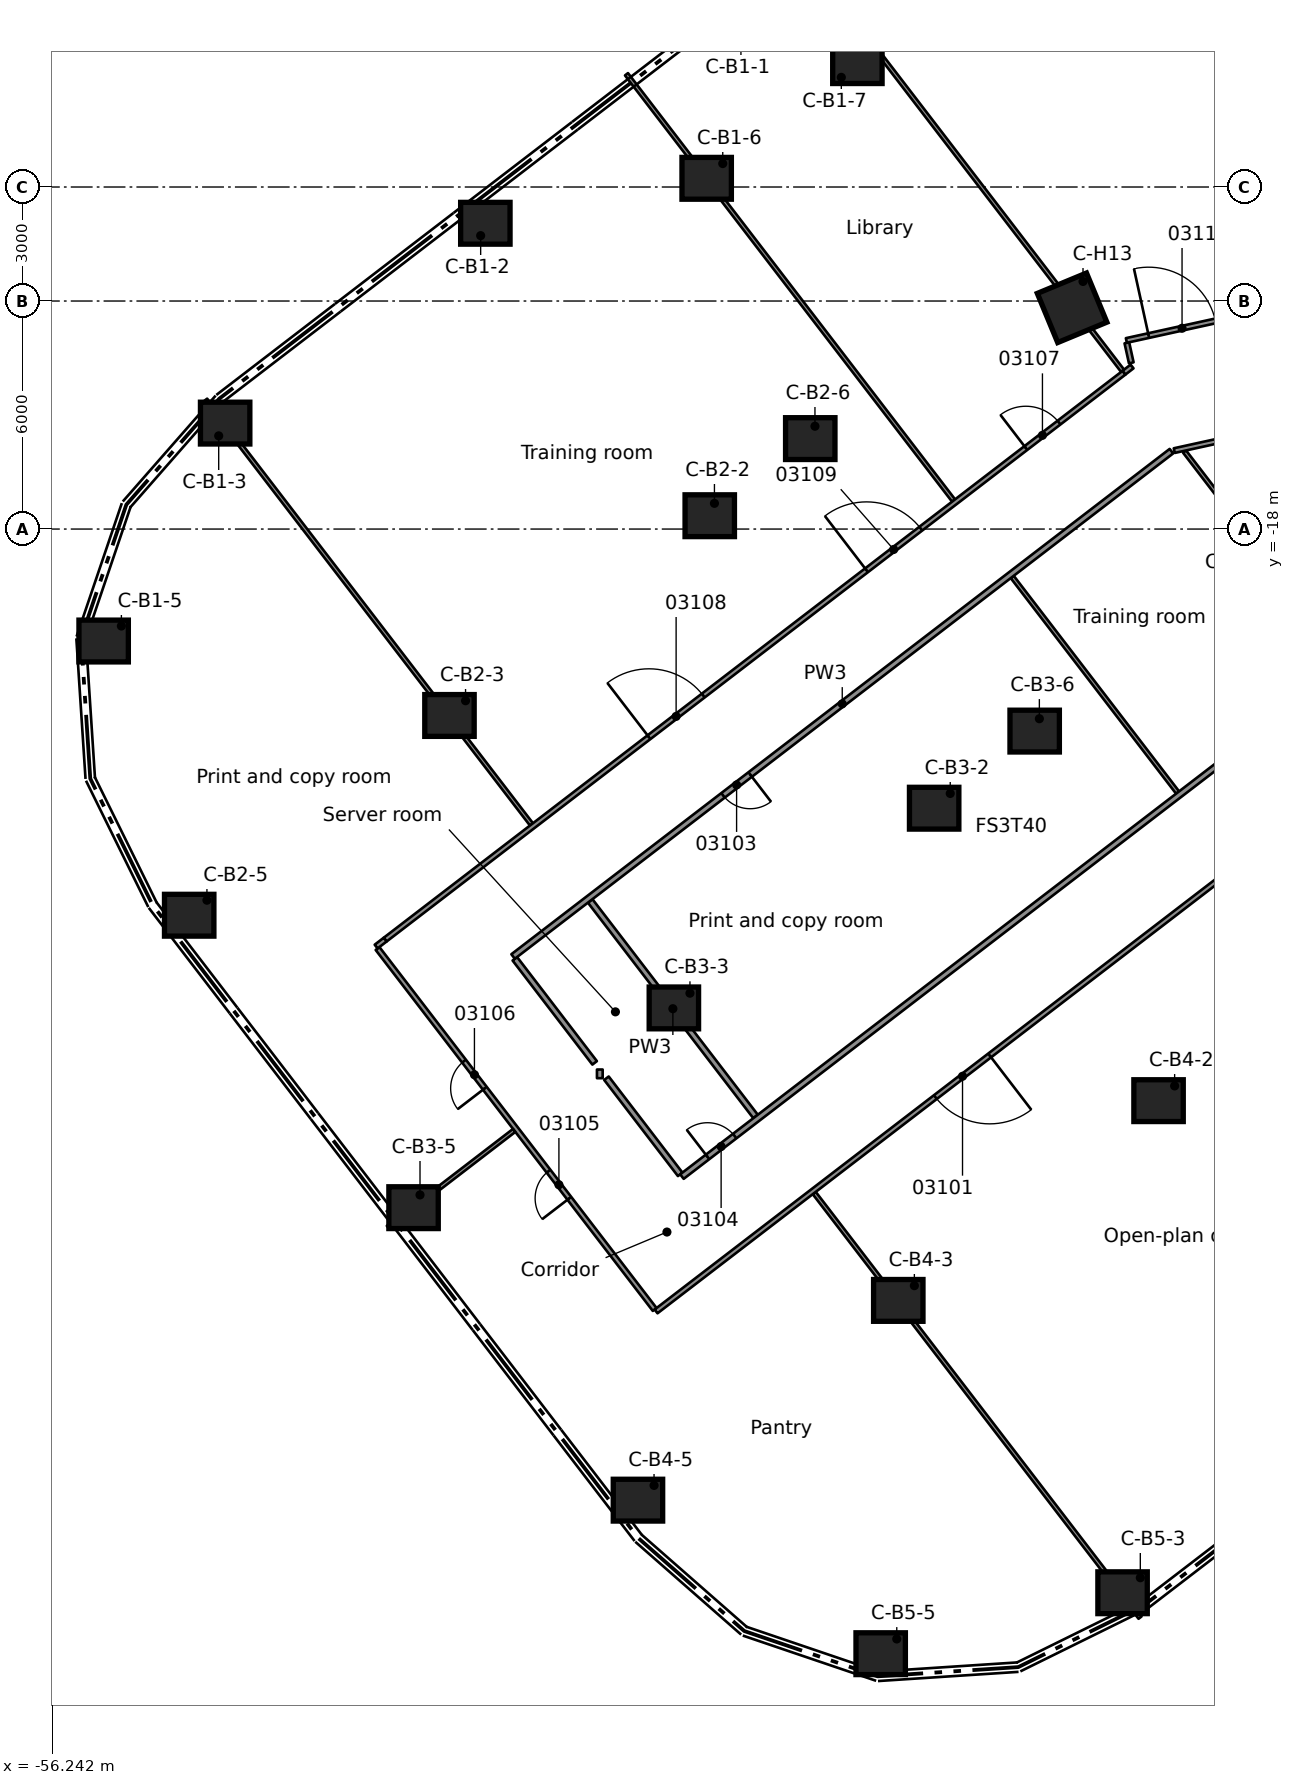
"""IFC4 building model, lengths in metres.
Left out: names, types, materials, properties, quantities, classifications, styles, units other than length and angle.
Written with IfcOpenShell. Run it as: python <this file> out.ifc"""

import sys

from ifc_helpers import new_model, si_unit, direction, frame, frame_2d, origin, origin_2d, place, context, subcontext, project, spatial, rectangle, extrude, element, fill, save


model = new_model("IFC4")
c1 = context("Model", 3, precision=1e-05, world=origin(), true_north=direction((0.0, 1.0)))
c2 = subcontext(c1, "Body", "Model", "MODEL_VIEW")
j1 = project(units=[si_unit("LENGTHUNIT", "METRE"), si_unit("PLANEANGLEUNIT", "RADIAN")], contexts=[c1])
p1 = place(None, origin())
s1 = spatial("IfcSite", under=j1, at=p1, CompositionType="ELEMENT")
p2 = place(p1, origin())
s2 = spatial("IfcBuilding", under=s1, at=p2, CompositionType="ELEMENT")
p3 = place(p2, frame((0.0, 0.0, 15.5)))
s3 = spatial("IfcBuildingStorey", under=s2, at=p3, CompositionType="ELEMENT", Elevation=15.5)
for number, where, z_axis, x_axis in (
    (1, (-44.84, -9.954, 0.0), (0.0, 0.0, 1.0), (1.0, 0.0, 0.0)),
    (2, (-51.687, -15.212, 0.0), (0.0, 0.0, 1.0), (1.0, 0.0, 0.0)),
    (3, (-54.884, -20.946, 0.0), (0.0, 0.0, 1.0), (1.0, 0.0, 0.0)),
    (4, (-39.016, -8.771, 0.0), (0.0, 0.0, 1.0), (1.0, 0.0, 0.0)),
    (5, (-35.05, -5.727, 0.0), (0.0, 0.0, 1.0), (1.0, 0.0, 0.0)),
    (6, (-38.935, -17.649, 0.0), (0.0, 0.0, 1.0), (1.0, 0.0, 0.0)),
    (7, (-45.784, -22.905, 0.0), (0.0, 0.0, 1.0), (1.0, 0.0, 0.0)),
    (8, (-52.633, -28.161, 0.0), (0.0, 0.0, 1.0), (1.0, 0.0, 0.0)),
    (9, (-36.29, -15.62, 0.0), (0.0, 0.0, 1.0), (1.0, 0.0, 0.0)),
    (10, (-33.03, -25.345, 0.0), (0.0, 0.0, 1.0), (1.0, 0.0, 0.0)),
    (11, (-39.879, -30.6, 0.0), (0.0, 0.0, 1.0), (1.0, 0.0, 0.0)),
    (12, (-46.729, -35.856, 0.0), (0.0, 0.0, 1.0), (1.0, 0.0, 0.0)),
    (13, (-30.385, -23.316, 0.0), (0.0, 0.0, 1.0), (1.0, 0.0, 0.0)),
    (14, (-27.125, -33.04, 0.0), (0.0, 0.0, 1.0), (1.0, 0.0, 0.0)),
    (15, (-33.974, -38.296, 0.0), (0.0, 0.0, 1.0), (1.0, 0.0, 0.0)),
    (16, (-40.824, -43.552, 0.0), (0.0, 0.0, 1.0), (1.0, 0.0, 0.0)),
    (17, (-28.072, -45.988, 0.0), (0.0, 0.0, 1.0), (1.0, 0.0, 0.0)),
    (18, (-34.437, -47.592, 0.0), (0.0, 0.0, 1.0), (1.0, 0.0, 0.0)),
):
    element("IfcColumn", number, at=place(p3, frame(where, z_axis=z_axis, x_axis=x_axis)), inside=s3, PredefinedType="COLUMN", context=c2, shape_type="SweptSolid", body=[
        extrude(rectangle(XDim=1.3, YDim=1.1, at=origin_2d()), origin(), (0.0, 0.0, 1.0), 5.0),
    ])
p4 = place(p3, frame((-29.4, -12.178, 0.0), z_axis=(0.0, 0.0, 1.0), x_axis=(-0.923879532511, -0.382683432365, 0.0)))
e19 = element("IfcColumn", 19, at=p4, inside=s3, PredefinedType="COLUMN", context=c2, shape_type="SweptSolid", body=[
    extrude(rectangle(XDim=1.4, YDim=1.4, at=origin_2d()), origin(), (0.0, 0.0, 1.0), 5.0),
])
p5 = place(p3, frame((-27.959, -13.1, 0.0), z_axis=(0.0, 0.0, 1.0), x_axis=(0.215346078447, -0.976537795734, 0.0)))
e20 = element("IfcWall", 20, at=p5, inside=s3, PredefinedType="PARTITIONING", context=c2, shape_type="SweptSolid", body=[
    extrude(rectangle(XDim=0.539, YDim=0.125, at=frame_2d((0.269, 0.0))), origin(), (0.0, 0.0, 1.0), 4.58),
])
p6 = place(p3, frame((-40.384, -38.535, 0.0), z_axis=(0.0, 0.0, 1.0), x_axis=(-0.609026744184, 0.793149686294, 0.0)))
e21 = element("IfcWall", 21, at=p6, inside=s3, PredefinedType="PARTITIONING", context=c2, shape_type="SweptSolid", body=[
    extrude(rectangle(XDim=11.975, YDim=0.125, at=frame_2d((5.987, 0.0))), origin(), (0.0, 0.0, 1.0), 4.58),
])
p7 = place(p6, frame((3.688, 0.0, 0.0)))
e22 = element("IfcOpeningElement", 22, at=p7, cuts=e21, PredefinedType="OPENING", context=c2, shape_type="SweptSolid", body=[
    extrude(rectangle(XDim=0.9, YDim=2.1, at=frame_2d((0.45, 1.05))), frame((0.0, 0.073, 0.0), z_axis=(0.0, -1.0, 0.0), x_axis=(1.0, 0.0, 0.0)), (0.0, 0.0, 1.0), 0.145),
])
p8 = place(p6, frame((7.338, 0.0, 0.0)))
e23 = element("IfcOpeningElement", 23, at=p8, cuts=e21, PredefinedType="OPENING", context=c2, shape_type="SweptSolid", body=[
    extrude(rectangle(XDim=0.9, YDim=2.1, at=frame_2d((0.45, 1.05))), frame((0.0, 0.073, 0.0), z_axis=(0.0, -1.0, 0.0), x_axis=(1.0, 0.0, 0.0)), (0.0, 0.0, 1.0), 0.145),
])
p9 = place(p3, frame((-44.064, -29.307, 0.0), z_axis=(0.0, 0.0, 1.0), x_axis=(0.608421148176, -0.793614331053, 0.0)))
e24 = element("IfcWall", 24, at=p9, inside=s3, PredefinedType="PARTITIONING", context=c2, shape_type="SweptSolid", body=[
    extrude(rectangle(XDim=3.451, YDim=0.15, at=frame_2d((1.726, 0.0))), origin(), (0.0, 0.0, 1.0), 4.58),
])
p10 = place(p3, frame((-41.653, -32.45, 0.0), z_axis=(0.0, 0.0, 1.0), x_axis=(0.60867753108, -0.793417710389, 0.0)))
e25 = element("IfcWall", 25, at=p10, inside=s3, PredefinedType="PARTITIONING", context=c2, shape_type="SweptSolid", body=[
    extrude(rectangle(XDim=3.188, YDim=0.15, at=frame_2d((1.594, 0.0))), origin(), (0.0, 0.0, 1.0), 4.58),
])
p11 = place(p3, frame((-52.2, -14.599, 0.0), z_axis=(0.0, 0.0, 1.0), x_axis=(0.608818023879, -0.793309910312, 0.0)))
e26 = element("IfcWall", 26, at=p11, inside=s3, PredefinedType="PARTITIONING", context=c2, shape_type="SweptSolid", body=[
    extrude(rectangle(XDim=14.081, YDim=0.1, at=frame_2d((7.041, 0.0))), origin(), (0.0, 0.0, 1.0), 4.58),
])
p12 = place(p3, frame((-42.081, -27.785, 0.0), z_axis=(0.0, 0.0, 1.0), x_axis=(0.608713303315, -0.793390266116, 0.0)))
e27 = element("IfcWall", 27, at=p12, inside=s3, PredefinedType="PARTITIONING", context=c2, shape_type="SweptSolid", body=[
    extrude(rectangle(XDim=7.148, YDim=0.15, at=frame_2d((3.574, 0.0))), origin(), (0.0, 0.0, 1.0), 4.58),
])
p13 = place(p3, frame((-36.185, -35.471, 0.0), z_axis=(0.0, 0.0, 1.0), x_axis=(0.608776156658, -0.793342039152, 0.0)))
e28 = element("IfcWall", 28, at=p13, inside=s3, PredefinedType="PARTITIONING", context=c2, shape_type="SweptSolid", body=[
    extrude(rectangle(XDim=14.082, YDim=0.1, at=frame_2d((7.041, 0.0))), origin(), (0.0, 0.0, 1.0), 4.58),
])
p14 = place(p3, frame((-41.126, -6.033, 0.0), z_axis=(0.0, 0.0, 1.0), x_axis=(0.608775561638, -0.793342495743, 0.0)))
e29 = element("IfcWall", 29, at=p14, inside=s3, PredefinedType="PARTITIONING", context=c2, shape_type="SweptSolid", body=[
    extrude(rectangle(XDim=14.136, YDim=0.1, at=frame_2d((7.068, 0.0))), origin(), (0.0, 0.0, 1.0), 4.58),
])
p15 = place(p3, frame((-30.975, -19.261, 0.0), z_axis=(0.0, 0.0, 1.0), x_axis=(0.608667353297, -0.793425518263, 0.0)))
e30 = element("IfcWall", 30, at=p15, inside=s3, PredefinedType="PARTITIONING", context=c2, shape_type="SweptSolid", body=[
    extrude(rectangle(XDim=7.15, YDim=0.1, at=frame_2d((3.575, 0.0))), origin(), (0.0, 0.0, 1.0), 4.58),
])
p16 = place(p3, frame((-36.678, -2.62, 0.0), z_axis=(0.0, 0.0, 1.0), x_axis=(0.608783902678, -0.793336095132, 0.0)))
e31 = element("IfcWall", 31, at=p16, inside=s3, PredefinedType="PARTITIONING", context=c2, shape_type="SweptSolid", body=[
    extrude(rectangle(XDim=14.136, YDim=0.1, at=frame_2d((7.068, 0.0))), origin(), (0.0, 0.0, 1.0), 4.58),
])
p17 = place(p3, frame((-26.44, -15.962, 0.0), z_axis=(0.0, 0.0, 1.0), x_axis=(0.608697215762, -0.79340260872, 0.0)))
e32 = element("IfcWall", 32, at=p17, inside=s3, PredefinedType="PARTITIONING", context=c2, shape_type="SweptSolid", body=[
    extrude(rectangle(XDim=6.79, YDim=0.1, at=frame_2d((3.395, 0.0))), origin(), (0.0, 0.0, 1.0), 4.58),
])
p18 = place(p3, frame((-26.712, -15.936, 0.0), z_axis=(0.0, 0.0, 1.0), x_axis=(0.976756126143, 0.214353609817, 0.0)))
e33 = element("IfcWall", 33, at=p18, inside=s3, PredefinedType="PARTITIONING", context=c2, shape_type="SweptSolid", body=[
    extrude(rectangle(XDim=2.328, YDim=0.125, at=frame_2d((1.164, 0.0))), origin(), (0.0, 0.0, 1.0), 4.58),
])
p19 = place(p3, frame((-27.972, -13.038, 0.0), z_axis=(0.0, 0.0, 1.0), x_axis=(0.976718013582, 0.214527205604, 0.0)))
e34 = element("IfcWall", 34, at=p19, inside=s3, PredefinedType="PARTITIONING", context=c2, shape_type="SweptSolid", body=[
    extrude(rectangle(XDim=2.937, YDim=0.125, at=frame_2d((1.469, 0.0))), origin(), (0.0, 0.0, 1.0), 4.58),
])
p20 = place(p19, frame((0.6, 0.0, 0.0)))
e35 = element("IfcOpeningElement", 35, at=p20, cuts=e34, PredefinedType="OPENING", context=c2, shape_type="SweptSolid", body=[
    extrude(rectangle(XDim=1.8, YDim=2.1, at=frame_2d((0.9, 1.05))), frame((0.0, 0.073, 0.0), z_axis=(0.0, -1.0, 0.0), x_axis=(1.0, 0.0, 0.0)), (0.0, 0.0, 1.0), 0.145),
])
p21 = place(p3, frame((-20.593, -23.429, 0.0), z_axis=(0.0, 0.0, 1.0), x_axis=(-0.793381896857, -0.60872421156, 0.0)))
e36 = element("IfcWall", 36, at=p21, inside=s3, PredefinedType="PARTITIONING", context=c2, shape_type="SweptSolid", body=[
    extrude(rectangle(XDim=24.9, YDim=0.125, at=frame_2d((12.45, 0.0))), origin(), (0.0, 0.0, 1.0), 4.58),
])
p22 = place(p21, frame((2.444, 0.0, 0.0)))
e37 = element("IfcOpeningElement", 37, at=p22, cuts=e36, PredefinedType="OPENING", context=c2, shape_type="SweptSolid", body=[
    extrude(rectangle(XDim=1.1, YDim=2.1, at=frame_2d((0.55, 1.05))), frame((0.0, 0.073, 0.0), z_axis=(0.0, -1.0, 0.0), x_axis=(1.0, 0.0, 0.0)), (0.0, 0.0, 1.0), 0.145),
])
p23 = place(p21, frame((13.835, 0.0, 0.0)))
e38 = element("IfcOpeningElement", 38, at=p23, cuts=e36, PredefinedType="OPENING", context=c2, shape_type="SweptSolid", body=[
    extrude(rectangle(XDim=1.8, YDim=2.1, at=frame_2d((0.9, 1.05))), frame((0.0, 0.073, 0.0), z_axis=(0.0, -1.0, 0.0), x_axis=(1.0, 0.0, 0.0)), (0.0, 0.0, 1.0), 0.145),
])
p24 = place(p3, frame((-39.667, -35.038, 0.0), z_axis=(0.0, 0.0, 1.0), x_axis=(0.793278123289, 0.608859441177, 0.0)))
e39 = element("IfcWall", 39, at=p24, inside=s3, PredefinedType="PARTITIONING", context=c2, shape_type="SweptSolid", body=[
    extrude(rectangle(XDim=21.532, YDim=0.15, at=frame_2d((10.766, 0.0))), origin(), (0.0, 0.0, 1.0), 4.58),
])
p25 = place(p24, frame((18.6, 0.0, 0.0)))
e40 = element("IfcOpeningElement", 40, at=p25, cuts=e39, PredefinedType="OPENING", context=c2, shape_type="SweptSolid", body=[
    extrude(rectangle(XDim=1.0, YDim=2.1, at=frame_2d((0.5, 1.05))), frame((0.0, 0.085, 0.0), z_axis=(0.0, -1.0, 0.0), x_axis=(1.0, 0.0, 0.0)), (0.0, 0.0, 1.0), 0.17),
])
p26 = place(p24, frame((0.85, 0.0, 0.0)))
e41 = element("IfcOpeningElement", 41, at=p26, cuts=e39, PredefinedType="OPENING", context=c2, shape_type="SweptSolid", body=[
    extrude(rectangle(XDim=0.9, YDim=2.1, at=frame_2d((0.45, 1.05))), frame((0.0, 0.085, 0.0), z_axis=(0.0, -1.0, 0.0), x_axis=(1.0, 0.0, 0.0)), (0.0, 0.0, 1.0), 0.17),
])
p27 = place(p3, frame((-47.403, -36.374, 0.0), z_axis=(0.0, 0.0, 1.0), x_axis=(0.793154740431, 0.609020162008, 0.0)))
e42 = element("IfcWall", 42, at=p27, inside=s3, PredefinedType="PARTITIONING", context=c2, shape_type="SweptSolid", body=[
    extrude(rectangle(XDim=4.187, YDim=0.1, at=frame_2d((2.094, 0.0))), origin(), (0.0, 0.0, 1.0), 4.58),
])
p28 = place(p3, frame((-26.787, -15.951, 0.0), z_axis=(0.0, 0.0, 1.0), x_axis=(-0.793270647626, -0.608869181035, 0.0)))
e43 = element("IfcWall", 43, at=p28, inside=s3, PredefinedType="PARTITIONING", context=c2, shape_type="SweptSolid", body=[
    extrude(rectangle(XDim=21.837, YDim=0.15, at=frame_2d((10.919, 0.0))), origin(), (0.0, 0.0, 1.0), 4.58),
])
p29 = place(p28, frame((13.973, 0.0, 0.0)))
e44 = element("IfcOpeningElement", 44, at=p29, cuts=e43, PredefinedType="OPENING", context=c2, shape_type="SweptSolid", body=[
    extrude(rectangle(XDim=0.9, YDim=2.1, at=frame_2d((0.45, 1.05))), frame((0.0, 0.085, 0.0), z_axis=(0.0, -1.0, 0.0), x_axis=(1.0, 0.0, 0.0)), (0.0, 0.0, 1.0), 0.17),
])
p30 = place(p3, frame((-47.476, -28.803, 0.0), z_axis=(0.0, 0.0, 1.0), x_axis=(0.793397382488, 0.608704027801, 0.0)))
e45 = element("IfcWall", 45, at=p30, inside=s3, PredefinedType="PARTITIONING", context=c2, shape_type="SweptSolid", body=[
    extrude(rectangle(XDim=24.506, YDim=0.125, at=frame_2d((12.253, 0.0))), origin(), (0.0, 0.0, 1.0), 4.58),
])
p31 = place(p30, frame((21.249, 0.0, 0.0)))
e46 = element("IfcOpeningElement", 46, at=p31, cuts=e45, PredefinedType="OPENING", context=c2, shape_type="SweptSolid", body=[
    extrude(rectangle(XDim=1.1, YDim=2.1, at=frame_2d((0.55, 1.05))), frame((0.0, 0.073, 0.0), z_axis=(0.0, -1.0, 0.0), x_axis=(1.0, 0.0, 0.0)), (0.0, 0.0, 1.0), 0.145),
])
p32 = place(p30, frame((8.75, 0.0, 0.0)))
e47 = element("IfcOpeningElement", 47, at=p32, cuts=e45, PredefinedType="OPENING", context=c2, shape_type="SweptSolid", body=[
    extrude(rectangle(XDim=1.8, YDim=2.1, at=frame_2d((0.9, 1.05))), frame((0.0, 0.073, 0.0), z_axis=(0.0, -1.0, 0.0), x_axis=(1.0, 0.0, 0.0)), (0.0, 0.0, 1.0), 0.145),
])
p33 = place(p30, frame((15.965, 0.0, 0.0)))
e48 = element("IfcOpeningElement", 48, at=p33, cuts=e45, PredefinedType="OPENING", context=c2, shape_type="SweptSolid", body=[
    extrude(rectangle(XDim=1.8, YDim=2.1, at=frame_2d((0.9, 1.05))), frame((0.0, 0.073, 0.0), z_axis=(0.0, -1.0, 0.0), x_axis=(1.0, 0.0, 0.0)), (0.0, 0.0, 1.0), 0.145),
])
p34 = place(p3, frame((-28.034, -13.885, 0.0), z_axis=(0.0, 0.0, 1.0), x_axis=(0.792488206653, 0.609887237378, 0.0)))
e49 = element("IfcWall", 49, at=p34, inside=s3, PredefinedType="PARTITIONING", context=c2, shape_type="SweptSolid", body=[
    extrude(rectangle(XDim=0.267, YDim=0.125, at=frame_2d((0.134, 0.0))), origin(), (0.0, 0.0, 1.0), 4.58),
])
p35 = place(p3, frame((-47.714, -28.986, 0.0), z_axis=(0.0, 0.0, 1.0), x_axis=(0.792623989105, 0.60971076085, 0.0)))
e50 = element("IfcWall", 50, at=p35, inside=s3, PredefinedType="PARTITIONING", context=c2, shape_type="SweptSolid", body=[
    extrude(rectangle(XDim=0.3, YDim=0.125, at=frame_2d((0.15, 0.0))), origin(), (0.0, 0.0, 1.0), 4.58),
])
p36 = place(p3, frame((-41.828, -32.449, 0.0), z_axis=(0.0, 0.0, 1.0), x_axis=(0.0, 1.0, 0.0)))
e51 = element("IfcWall", 51, at=p36, inside=s3, PredefinedType="PARTITIONING", context=c2, shape_type="SweptSolid", body=[
    extrude(rectangle(XDim=0.228, YDim=0.15, at=frame_2d((0.114, 0.0))), origin(), (0.0, 0.0, 1.0), 4.58),
])
p37 = place(p23, origin())
e52 = element("IfcDoor", 52, at=p37, inside=s3, OperationType="DOUBLE_DOOR_SINGLE_SWING", PredefinedType="DOOR", context=c2, shape_type="SweptSolid", body=[
    extrude(rectangle(XDim=1.8, YDim=2.1, at=frame_2d((0.9, 1.05))), frame((0.0, 0.025, 0.0), z_axis=(0.0, -1.0, 0.0), x_axis=(1.0, 0.0, 0.0)), (0.0, 0.0, 1.0), 0.05),
])
fill(e38, e52)
p38 = place(p29, origin())
e53 = element("IfcDoor", 53, at=p38, inside=s3, OperationType="SINGLE_SWING_RIGHT", PredefinedType="DOOR", context=c2, shape_type="SweptSolid", body=[
    extrude(rectangle(XDim=0.9, YDim=2.1, at=frame_2d((0.45, 1.05))), frame((0.0, 0.025, 0.0), z_axis=(0.0, -1.0, 0.0), x_axis=(1.0, 0.0, 0.0)), (0.0, 0.0, 1.0), 0.05),
])
fill(e44, e53)
p39 = place(p26, origin())
e54 = element("IfcDoor", 54, at=p39, inside=s3, OperationType="SINGLE_SWING_LEFT", PredefinedType="DOOR", context=c2, shape_type="SweptSolid", body=[
    extrude(rectangle(XDim=0.9, YDim=2.1, at=frame_2d((0.45, 1.05))), frame((0.0, 0.025, 0.0), z_axis=(0.0, -1.0, 0.0), x_axis=(1.0, 0.0, 0.0)), (0.0, 0.0, 1.0), 0.05),
])
fill(e41, e54)
p40 = place(p7, origin())
e55 = element("IfcDoor", 55, at=p40, inside=s3, OperationType="SINGLE_SWING_LEFT", PredefinedType="DOOR", context=c2, shape_type="SweptSolid", body=[
    extrude(rectangle(XDim=0.9, YDim=2.1, at=frame_2d((0.45, 1.05))), frame((0.0, 0.025, 0.0), z_axis=(0.0, -1.0, 0.0), x_axis=(1.0, 0.0, 0.0)), (0.0, 0.0, 1.0), 0.05),
])
fill(e22, e55)
p41 = place(p8, origin())
e56 = element("IfcDoor", 56, at=p41, inside=s3, OperationType="SINGLE_SWING_RIGHT", PredefinedType="DOOR", context=c2, shape_type="SweptSolid", body=[
    extrude(rectangle(XDim=0.9, YDim=2.1, at=frame_2d((0.45, 1.05))), frame((0.0, 0.025, 0.0), z_axis=(0.0, -1.0, 0.0), x_axis=(1.0, 0.0, 0.0)), (0.0, 0.0, 1.0), 0.05),
])
fill(e23, e56)
p42 = place(p31, origin())
e57 = element("IfcDoor", 57, at=p42, inside=s3, OperationType="SINGLE_SWING_RIGHT", PredefinedType="DOOR", context=c2, shape_type="SweptSolid", body=[
    extrude(rectangle(XDim=1.1, YDim=2.1, at=frame_2d((0.55, 1.05))), frame((0.0, 0.025, 0.0), z_axis=(0.0, -1.0, 0.0), x_axis=(1.0, 0.0, 0.0)), (0.0, 0.0, 1.0), 0.05),
])
fill(e46, e57)
p43 = place(p32, origin())
e58 = element("IfcDoor", 58, at=p43, inside=s3, OperationType="DOUBLE_DOOR_SINGLE_SWING", PredefinedType="DOOR", context=c2, shape_type="SweptSolid", body=[
    extrude(rectangle(XDim=1.8, YDim=2.1, at=frame_2d((0.9, 1.05))), frame((0.0, 0.025, 0.0), z_axis=(0.0, -1.0, 0.0), x_axis=(1.0, 0.0, 0.0)), (0.0, 0.0, 1.0), 0.05),
])
fill(e47, e58)
p44 = place(p33, origin())
e59 = element("IfcDoor", 59, at=p44, inside=s3, OperationType="DOUBLE_DOOR_SINGLE_SWING", PredefinedType="DOOR", context=c2, shape_type="SweptSolid", body=[
    extrude(rectangle(XDim=1.8, YDim=2.1, at=frame_2d((0.9, 1.05))), frame((0.0, 0.025, 0.0), z_axis=(0.0, -1.0, 0.0), x_axis=(1.0, 0.0, 0.0)), (0.0, 0.0, 1.0), 0.05),
])
fill(e48, e59)
p45 = place(p20, origin())
e60 = element("IfcDoor", 60, at=p45, inside=s3, OperationType="DOUBLE_DOOR_SINGLE_SWING", PredefinedType="DOOR", context=c2, shape_type="SweptSolid", body=[
    extrude(rectangle(XDim=1.8, YDim=2.1, at=frame_2d((0.9, 1.05))), frame((0.0, 0.025, 0.0), z_axis=(0.0, -1.0, 0.0), x_axis=(1.0, 0.0, 0.0)), (0.0, 0.0, 1.0), 0.05),
])
fill(e35, e60)
save(model, sys.argv[1])
